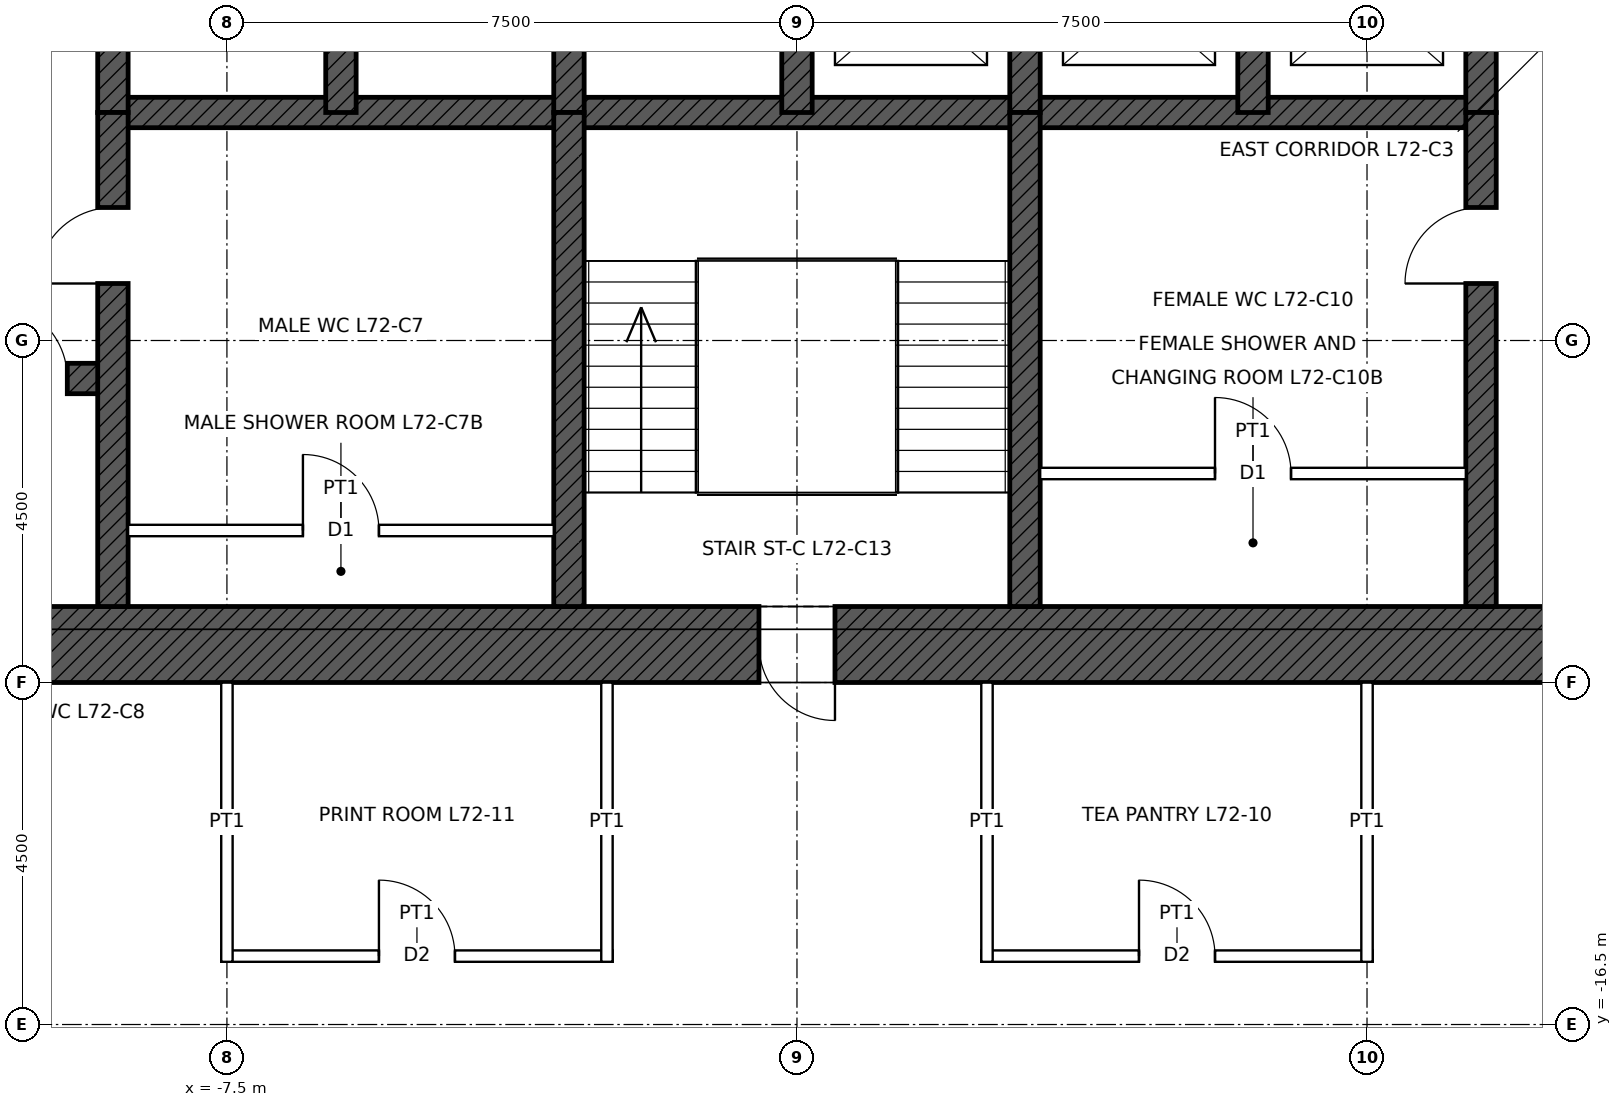
"""IFC4 building model, lengths in metres.
Left out: names, types, materials, properties, quantities, classifications, styles, units other than length and angle.
Written with IfcOpenShell. Run it as: python <this file> out.ifc"""

import sys

from ifc_helpers import new_model, si_unit, direction, frame, frame_2d, origin, place, context, subcontext, project, spatial, rectangle, extrude, element, fill, save


model = new_model("IFC4")
c1 = context("Model", 3, precision=1e-05, world=origin(), true_north=direction((0.0, 1.0)))
c2 = subcontext(c1, "Body", "Model", "MODEL_VIEW")
j1 = project(units=[si_unit("LENGTHUNIT", "METRE"), si_unit("PLANEANGLEUNIT", "RADIAN")], contexts=[c1])
p1 = place(None, origin())
s1 = spatial("IfcSite", under=j1, at=p1, CompositionType="ELEMENT")
p2 = place(p1, origin())
s2 = spatial("IfcBuilding", under=s1, at=p2, CompositionType="ELEMENT")
p3 = place(p2, frame((0.0, 0.0, 323.9)))
s3 = spatial("IfcBuildingStorey", under=s2, at=p3, CompositionType="ELEMENT", Elevation=323.9)
p4 = place(p3, frame((12.0, -11.5, 0.0), z_axis=(0.0, 0.0, 1.0), x_axis=(-1.0, 0.0, 0.0)))
e1 = element("IfcWall", 1, at=p4, inside=s3, PredefinedType="SHEAR", context=c2, shape_type="SweptSolid", body=[
    extrude(rectangle(XDim=24.0, YDim=1.0, at=frame_2d((12.0, 0.0))), origin(), (0.0, 0.0, 1.0), 4.0),
])
p5 = place(p4, frame((11.5, 0.0, 0.0)))
e2 = element("IfcOpeningElement", 2, at=p5, cuts=e1, PredefinedType="OPENING", context=c2, shape_type="SweptSolid", body=[
    extrude(rectangle(XDim=1.0, YDim=2.1, at=frame_2d((0.5, 1.05))), frame((0.0, 0.51, 0.0), z_axis=(0.0, -1.0, 0.0), x_axis=(1.0, 0.0, 0.0)), (0.0, 0.0, 1.0), 1.02),
])
p6 = place(p4, frame((1.0, 0.0, 0.0)))
e3 = element("IfcOpeningElement", 3, at=p6, cuts=e1, PredefinedType="OPENING", context=c2, shape_type="SweptSolid", body=[
    extrude(rectangle(XDim=1.0, YDim=2.4, at=frame_2d((0.5, 1.2))), frame((0.0, 0.51, 0.0), z_axis=(0.0, -1.0, 0.0), x_axis=(1.0, 0.0, 0.0)), (0.0, 0.0, 1.0), 1.02),
])
p7 = place(p3, frame((-9.0, -4.5, 0.0), z_axis=(0.0, 0.0, 1.0), x_axis=(1.0, 0.0, 0.0)))
e4 = element("IfcWall", 4, at=p7, inside=s3, PredefinedType="SHEAR", context=c2, shape_type="SweptSolid", body=[
    extrude(rectangle(XDim=18.0, YDim=0.4, at=frame_2d((9.0, 0.0))), origin(), (0.0, 0.0, 1.0), 4.0),
])
p8 = place(p3, frame((-11.0, -8.0, 0.0), z_axis=(0.0, 0.0, 1.0), x_axis=(1.0, 0.0, 0.0)))
e5 = element("IfcWall", 5, at=p8, inside=s3, PredefinedType="SHEAR", context=c2, shape_type="SweptSolid", body=[
    extrude(rectangle(XDim=2.0, YDim=0.4, at=frame_2d((1.0, 0.0))), origin(), (0.0, 0.0, 1.0), 4.0),
])
p9 = place(p8, frame((0.4, 0.0, 0.0)))
e6 = element("IfcOpeningElement", 6, at=p9, cuts=e5, PredefinedType="OPENING", context=c2, shape_type="SweptSolid", body=[
    extrude(rectangle(XDim=1.0, YDim=2.1, at=frame_2d((0.5, 1.05))), frame((0.0, 0.21, 0.0), z_axis=(0.0, -1.0, 0.0), x_axis=(1.0, 0.0, 0.0)), (0.0, 0.0, 1.0), 0.42),
])
for number, where, z_axis, x_axis in (
    (7, (-9.0, -4.5, 0.0), (0.0, 0.0, 1.0), (0.0, 1.0, 0.0)),
    (8, (9.0, -4.5, 0.0), (0.0, 0.0, 1.0), (0.0, 1.0, 0.0)),
    (9, (-6.0, -4.5, 0.0), (0.0, 0.0, 1.0), (0.0, 1.0, 0.0)),
    (10, (-3.0, -4.5, 0.0), (0.0, 0.0, 1.0), (0.0, 1.0, 0.0)),
    (11, (0.0, -4.5, 0.0), (0.0, 0.0, 1.0), (0.0, 1.0, 0.0)),
    (12, (3.0, -4.5, 0.0), (0.0, 0.0, 1.0), (0.0, 1.0, 0.0)),
    (13, (6.0, -4.5, 0.0), (0.0, 0.0, 1.0), (0.0, 1.0, 0.0)),
):
    element("IfcWall", number, at=place(p3, frame(where, z_axis=z_axis, x_axis=x_axis)), inside=s3, PredefinedType="SHEAR", context=c2, shape_type="SweptSolid", body=[
        extrude(rectangle(XDim=3.0, YDim=0.4, at=frame_2d((1.5, 0.0))), origin(), (0.0, 0.0, 1.0), 4.0),
    ])
p10 = place(p3, frame((-9.0, -11.0, 0.0), z_axis=(0.0, 0.0, 1.0), x_axis=(0.0, 1.0, 0.0)))
e14 = element("IfcWall", 14, at=p10, inside=s3, PredefinedType="SHEAR", context=c2, shape_type="SweptSolid", body=[
    extrude(rectangle(XDim=6.5, YDim=0.4, at=frame_2d((3.25, 0.0))), origin(), (0.0, 0.0, 1.0), 4.0),
])
p11 = place(p10, frame((4.25, 0.0, 0.0)))
e15 = element("IfcOpeningElement", 15, at=p11, cuts=e14, PredefinedType="OPENING", context=c2, shape_type="SweptSolid", body=[
    extrude(rectangle(XDim=1.0, YDim=2.1, at=frame_2d((0.5, 1.05))), frame((0.0, 0.21, 0.0), z_axis=(0.0, -1.0, 0.0), x_axis=(1.0, 0.0, 0.0)), (0.0, 0.0, 1.0), 0.42),
])
p12 = place(p3, frame((9.0, -11.0, 0.0), z_axis=(0.0, 0.0, 1.0), x_axis=(0.0, 1.0, 0.0)))
e16 = element("IfcWall", 16, at=p12, inside=s3, PredefinedType="SHEAR", context=c2, shape_type="SweptSolid", body=[
    extrude(rectangle(XDim=6.5, YDim=0.4, at=frame_2d((3.25, 0.0))), origin(), (0.0, 0.0, 1.0), 4.0),
])
p13 = place(p12, frame((4.25, 0.0, 0.0)))
e17 = element("IfcOpeningElement", 17, at=p13, cuts=e16, PredefinedType="OPENING", context=c2, shape_type="SweptSolid", body=[
    extrude(rectangle(XDim=1.0, YDim=2.1, at=frame_2d((0.5, 1.05))), frame((0.0, 0.21, 0.0), z_axis=(0.0, -1.0, 0.0), x_axis=(1.0, 0.0, 0.0)), (0.0, 0.0, 1.0), 0.42),
])
for number, where, z_axis, x_axis in (
    (18, (-3.0, -11.0, 0.0), (0.0, 0.0, 1.0), (0.0, 1.0, 0.0)),
    (19, (3.0, -11.0, 0.0), (0.0, 0.0, 1.0), (0.0, 1.0, 0.0)),
):
    element("IfcWall", number, at=place(p3, frame(where, z_axis=z_axis, x_axis=x_axis)), inside=s3, PredefinedType="SHEAR", context=c2, shape_type="SweptSolid", body=[
        extrude(rectangle(XDim=6.5, YDim=0.4, at=frame_2d((3.25, 0.0))), origin(), (0.0, 0.0, 1.0), 4.0),
    ])
p14 = place(p3, frame((-7.575, -15.6, 0.0), z_axis=(0.0, 0.0, 1.0), x_axis=(1.0, 0.0, 0.0)))
e20 = element("IfcWall", 20, at=p14, inside=s3, PredefinedType="PARTITIONING", context=c2, shape_type="SweptSolid", body=[
    extrude(rectangle(XDim=5.15, YDim=0.15, at=frame_2d((2.575, 0.0))), origin(), (0.0, 0.0, 1.0), 3.85),
])
p15 = place(p14, frame((2.075, 0.0, 0.0)))
e21 = element("IfcOpeningElement", 21, at=p15, cuts=e20, PredefinedType="OPENING", context=c2, shape_type="SweptSolid", body=[
    extrude(rectangle(XDim=1.0, YDim=2.1, at=frame_2d((0.5, 1.05))), frame((0.0, 0.085, 0.0), z_axis=(0.0, -1.0, 0.0), x_axis=(1.0, 0.0, 0.0)), (0.0, 0.0, 1.0), 0.17),
])
p16 = place(p3, frame((2.425, -15.6, 0.0), z_axis=(0.0, 0.0, 1.0), x_axis=(1.0, 0.0, 0.0)))
e22 = element("IfcWall", 22, at=p16, inside=s3, PredefinedType="PARTITIONING", context=c2, shape_type="SweptSolid", body=[
    extrude(rectangle(XDim=5.15, YDim=0.15, at=frame_2d((2.575, 0.0))), origin(), (0.0, 0.0, 1.0), 3.85),
])
p17 = place(p16, frame((2.075, 0.0, 0.0)))
e23 = element("IfcOpeningElement", 23, at=p17, cuts=e22, PredefinedType="OPENING", context=c2, shape_type="SweptSolid", body=[
    extrude(rectangle(XDim=1.0, YDim=2.1, at=frame_2d((0.5, 1.05))), frame((0.0, 0.085, 0.0), z_axis=(0.0, -1.0, 0.0), x_axis=(1.0, 0.0, 0.0)), (0.0, 0.0, 1.0), 0.17),
])
p18 = place(p3, frame((-7.5, -15.675, 0.0), z_axis=(0.0, 0.0, 1.0), x_axis=(0.0, 1.0, 0.0)))
e24 = element("IfcWall", 24, at=p18, inside=s3, PredefinedType="PARTITIONING", context=c2, shape_type="SweptSolid", body=[
    extrude(rectangle(XDim=3.675, YDim=0.15, at=frame_2d((1.837, 0.0))), origin(), (0.0, 0.0, 1.0), 3.243),
])
for number, where, z_axis, x_axis in (
    (25, (-2.5, -15.675, 0.0), (0.0, 0.0, 1.0), (0.0, 1.0, 0.0)),
    (26, (2.5, -15.675, 0.0), (0.0, 0.0, 1.0), (0.0, 1.0, 0.0)),
):
    element("IfcWall", number, at=place(p3, frame(where, z_axis=z_axis, x_axis=x_axis)), inside=s3, PredefinedType="PARTITIONING", context=c2, shape_type="SweptSolid", body=[
        extrude(rectangle(XDim=3.675, YDim=0.15, at=frame_2d((1.837, 0.0))), origin(), (0.0, 0.0, 1.0), 3.85),
    ])
p19 = place(p3, frame((7.5, -15.675, 0.0), z_axis=(0.0, 0.0, 1.0), x_axis=(0.0, 1.0, 0.0)))
e27 = element("IfcWall", 27, at=p19, inside=s3, PredefinedType="PARTITIONING", context=c2, shape_type="SweptSolid", body=[
    extrude(rectangle(XDim=3.675, YDim=0.15, at=frame_2d((1.837, 0.0))), origin(), (0.0, 0.0, 1.0), 3.243),
])
p20 = place(p3, frame((-8.8, -10.0, 0.0), z_axis=(0.0, 0.0, 1.0), x_axis=(1.0, 0.0, 0.0)))
e28 = element("IfcWall", 28, at=p20, inside=s3, PredefinedType="PARTITIONING", context=c2, shape_type="SweptSolid", body=[
    extrude(rectangle(XDim=5.6, YDim=0.15, at=frame_2d((2.8, 0.0))), origin(), (0.0, 0.0, 1.0), 3.75),
])
p21 = place(p20, frame((2.3, 0.0, 0.0)))
e29 = element("IfcOpeningElement", 29, at=p21, cuts=e28, PredefinedType="OPENING", context=c2, shape_type="SweptSolid", body=[
    extrude(rectangle(XDim=1.0, YDim=2.1, at=frame_2d((0.5, 1.05))), frame((0.0, 0.085, 0.0), z_axis=(0.0, -1.0, 0.0), x_axis=(1.0, 0.0, 0.0)), (0.0, 0.0, 1.0), 0.17),
])
p22 = place(p3, frame((3.2, -9.25, 0.0), z_axis=(0.0, 0.0, 1.0), x_axis=(1.0, 0.0, 0.0)))
e30 = element("IfcWall", 30, at=p22, inside=s3, PredefinedType="PARTITIONING", context=c2, shape_type="SweptSolid", body=[
    extrude(rectangle(XDim=5.6, YDim=0.15, at=frame_2d((2.8, 0.0))), origin(), (0.0, 0.0, 1.0), 3.75),
])
p23 = place(p22, frame((2.3, 0.0, 0.0)))
e31 = element("IfcOpeningElement", 31, at=p23, cuts=e30, PredefinedType="OPENING", context=c2, shape_type="SweptSolid", body=[
    extrude(rectangle(XDim=1.0, YDim=2.1, at=frame_2d((0.5, 1.05))), frame((0.0, 0.085, 0.0), z_axis=(0.0, -1.0, 0.0), x_axis=(1.0, 0.0, 0.0)), (0.0, 0.0, 1.0), 0.17),
])
p24 = place(p5, origin())
e32 = element("IfcDoor", 32, at=p24, inside=s3, OperationType="SINGLE_SWING_LEFT", PredefinedType="DOOR", context=c2, shape_type="SweptSolid", body=[
    extrude(rectangle(XDim=1.0, YDim=2.1, at=frame_2d((0.5, 1.05))), frame((0.0, 0.485, 0.0), z_axis=(0.0, -1.0, 0.0), x_axis=(1.0, 0.0, 0.0)), (0.0, 0.0, 1.0), 0.05),
])
fill(e2, e32)
p25 = place(p11, origin())
e33 = element("IfcDoor", 33, at=p25, inside=s3, OperationType="SINGLE_SWING_LEFT", PredefinedType="DOOR", context=c2, shape_type="SweptSolid", body=[
    extrude(rectangle(XDim=1.0, YDim=2.1, at=frame_2d((0.5, 1.05))), frame((0.0, 0.025, 0.0), z_axis=(0.0, -1.0, 0.0), x_axis=(1.0, 0.0, 0.0)), (0.0, 0.0, 1.0), 0.05),
])
fill(e15, e33)
p26 = place(p13, origin())
e34 = element("IfcDoor", 34, at=p26, inside=s3, OperationType="SINGLE_SWING_LEFT", PredefinedType="DOOR", context=c2, shape_type="SweptSolid", body=[
    extrude(rectangle(XDim=1.0, YDim=2.1, at=frame_2d((0.5, 1.05))), frame((0.0, 0.025, 0.0), z_axis=(0.0, -1.0, 0.0), x_axis=(1.0, 0.0, 0.0)), (0.0, 0.0, 1.0), 0.05),
])
fill(e17, e34)
p27 = place(p9, origin())
e35 = element("IfcDoor", 35, at=p27, inside=s3, OperationType="SINGLE_SWING_LEFT", PredefinedType="DOOR", context=c2, shape_type="SweptSolid", body=[
    extrude(rectangle(XDim=1.0, YDim=2.1, at=frame_2d((0.5, 1.05))), frame((0.0, 0.025, 0.0), z_axis=(0.0, -1.0, 0.0), x_axis=(1.0, 0.0, 0.0)), (0.0, 0.0, 1.0), 0.05),
])
fill(e6, e35)
p28 = place(p21, origin())
e36 = element("IfcDoor", 36, at=p28, inside=s3, OperationType="SINGLE_SWING_LEFT", PredefinedType="DOOR", context=c2, shape_type="SweptSolid", body=[
    extrude(rectangle(XDim=1.0, YDim=2.1, at=frame_2d((0.5, 1.05))), frame((0.0, 0.025, 0.0), z_axis=(0.0, -1.0, 0.0), x_axis=(1.0, 0.0, 0.0)), (0.0, 0.0, 1.0), 0.05),
])
fill(e29, e36)
p29 = place(p23, origin())
e37 = element("IfcDoor", 37, at=p29, inside=s3, OperationType="SINGLE_SWING_LEFT", PredefinedType="DOOR", context=c2, shape_type="SweptSolid", body=[
    extrude(rectangle(XDim=1.0, YDim=2.1, at=frame_2d((0.5, 1.05))), frame((0.0, 0.025, 0.0), z_axis=(0.0, -1.0, 0.0), x_axis=(1.0, 0.0, 0.0)), (0.0, 0.0, 1.0), 0.05),
])
fill(e31, e37)
p30 = place(p17, origin())
e38 = element("IfcDoor", 38, at=p30, inside=s3, OperationType="SINGLE_SWING_LEFT", PredefinedType="DOOR", context=c2, shape_type="SweptSolid", body=[
    extrude(rectangle(XDim=1.0, YDim=2.1, at=frame_2d((0.5, 1.05))), frame((0.0, 0.025, 0.0), z_axis=(0.0, -1.0, 0.0), x_axis=(1.0, 0.0, 0.0)), (0.0, 0.0, 1.0), 0.05),
])
fill(e23, e38)
p31 = place(p15, origin())
e39 = element("IfcDoor", 39, at=p31, inside=s3, OperationType="SINGLE_SWING_LEFT", PredefinedType="DOOR", context=c2, shape_type="SweptSolid", body=[
    extrude(rectangle(XDim=1.0, YDim=2.1, at=frame_2d((0.5, 1.05))), frame((0.0, 0.025, 0.0), z_axis=(0.0, -1.0, 0.0), x_axis=(1.0, 0.0, 0.0)), (0.0, 0.0, 1.0), 0.05),
])
fill(e21, e39)
save(model, sys.argv[1])
